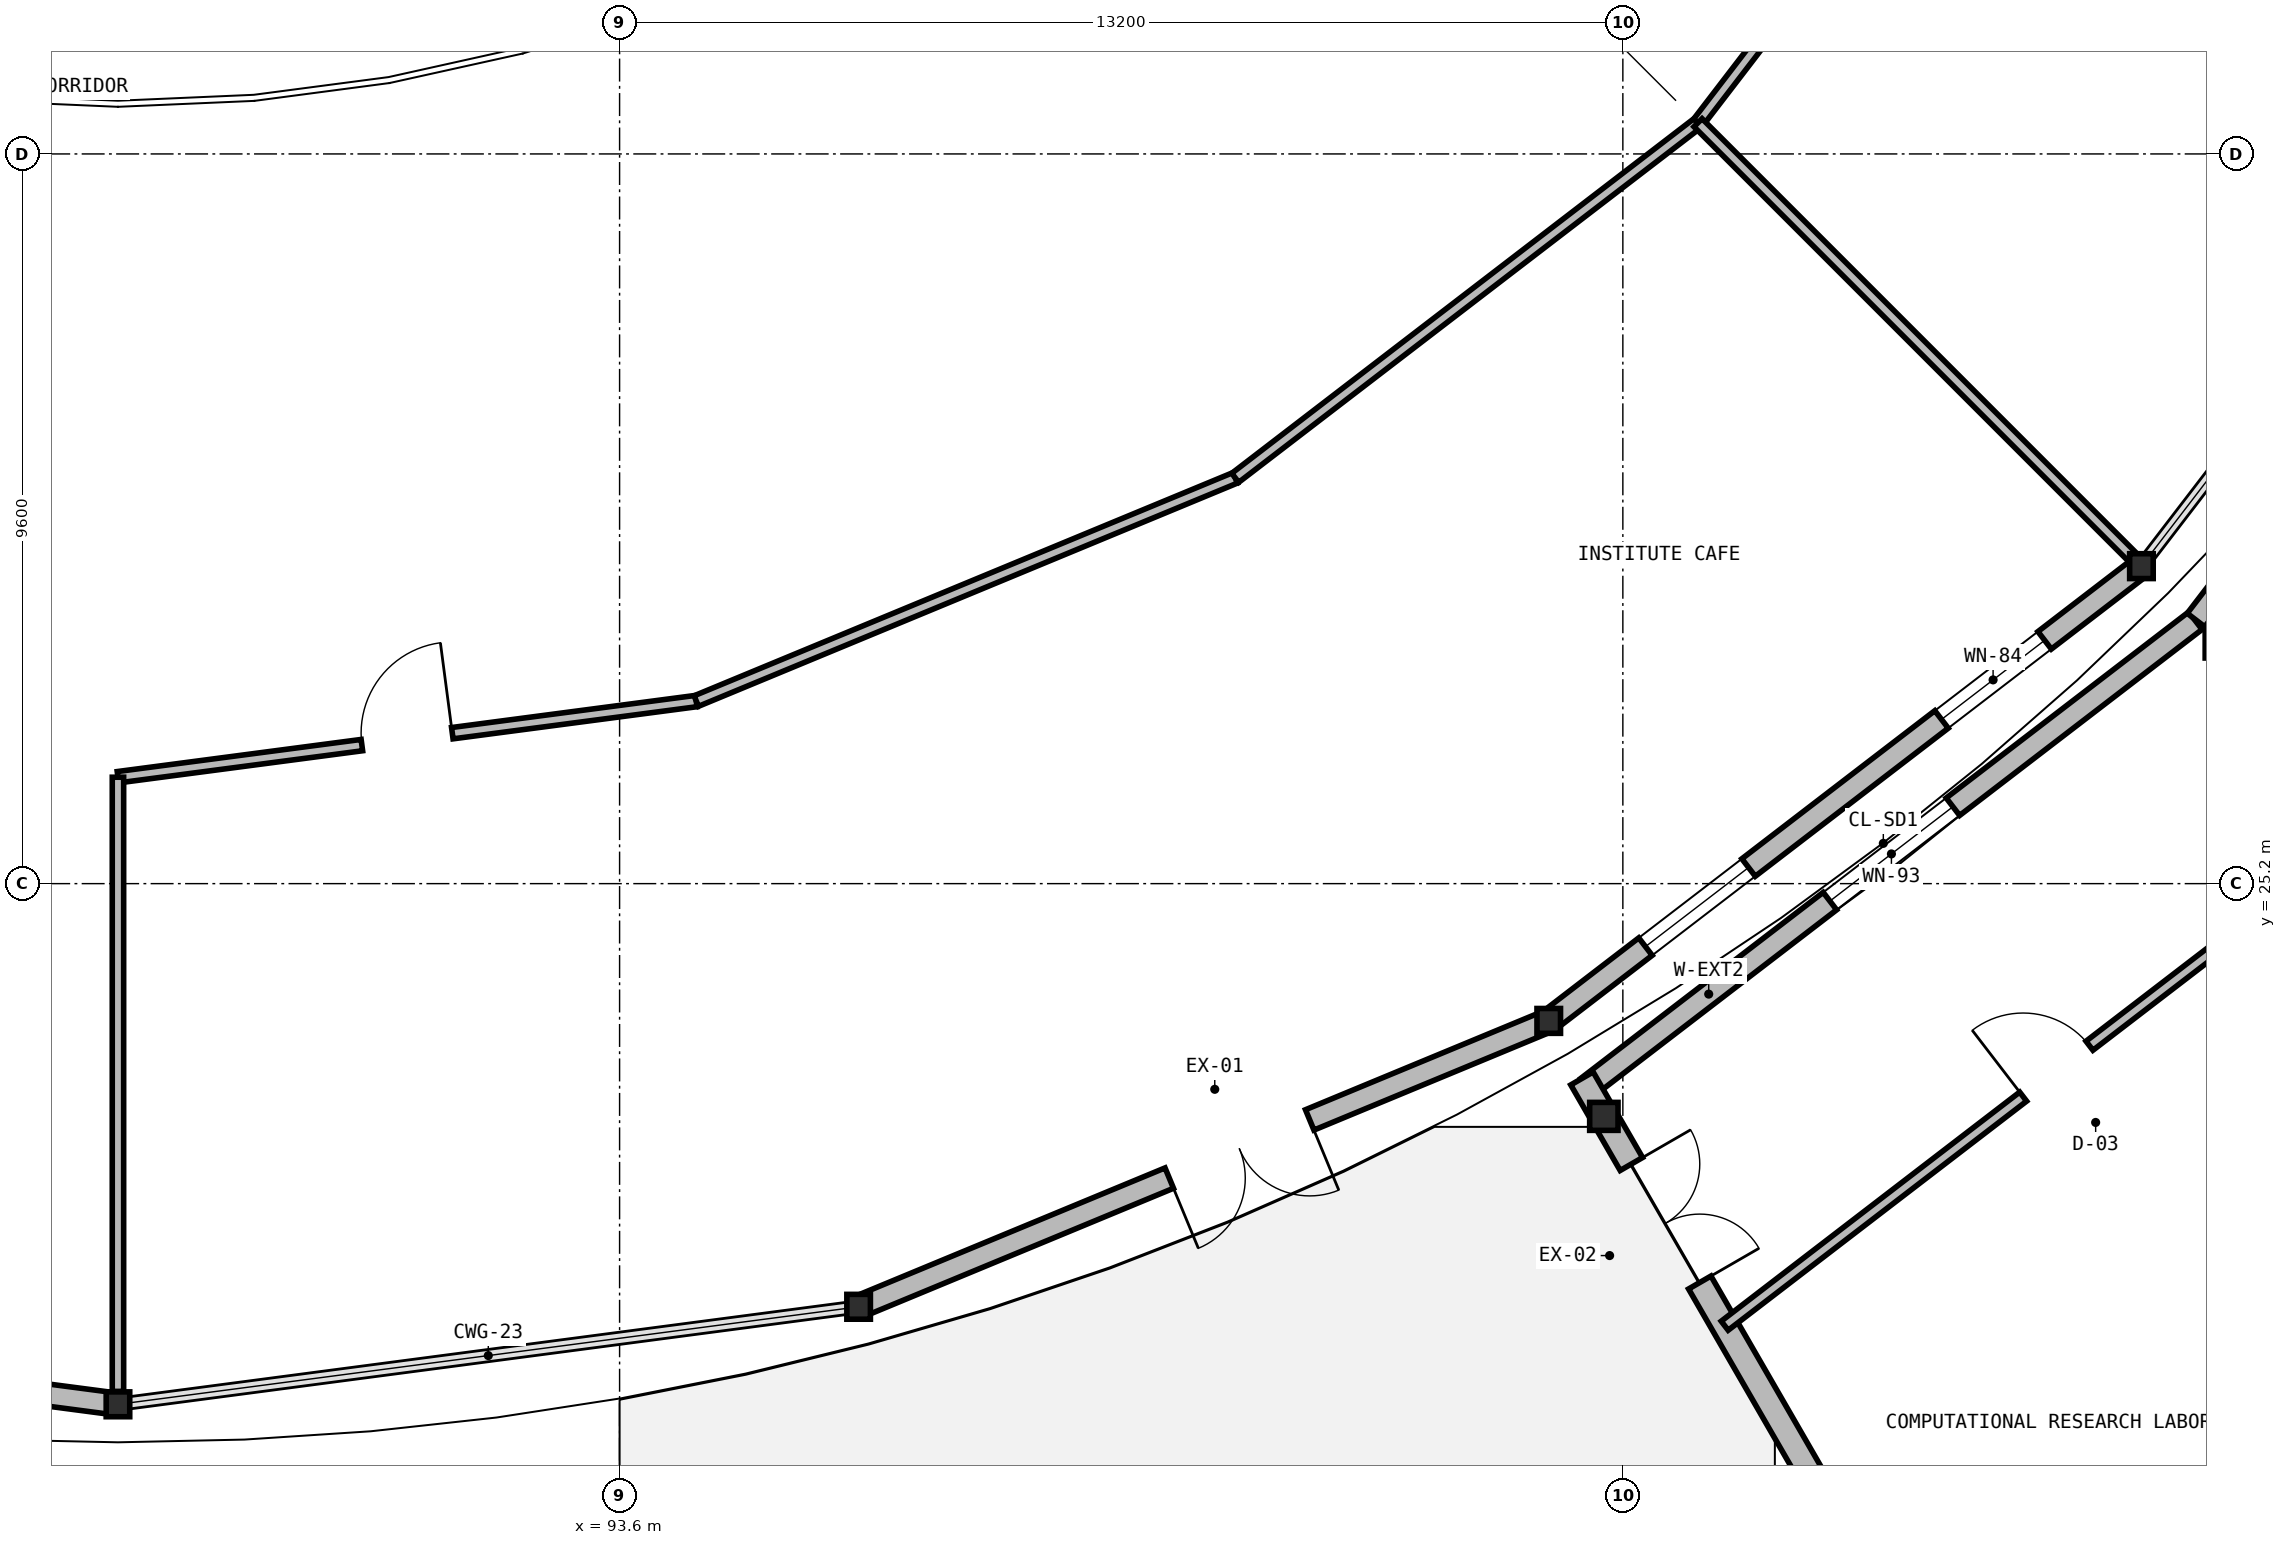
"""IFC4 building model, lengths in metres.
Left out: names, types, materials, properties, quantities, classifications, styles, units other than length and angle.
Written with IfcOpenShell. Run it as: python <this file> out.ifc"""

import sys

from ifc_helpers import new_model, si_unit, direction, frame, frame_2d, origin, origin_2d, place, context, subcontext, project, spatial, rectangle, i_section, extrude, element, fill, save


model = new_model("IFC4")
c1 = context("Model", 3, precision=1e-05, world=origin(), true_north=direction((0.0, 1.0)))
c2 = subcontext(c1, "Body", "Model", "MODEL_VIEW")
j1 = project(units=[si_unit("LENGTHUNIT", "METRE"), si_unit("PLANEANGLEUNIT", "RADIAN")], contexts=[c1])
p1 = place(None, origin())
s1 = spatial("IfcSite", under=j1, at=p1, CompositionType="ELEMENT")
p2 = place(p1, origin())
s2 = spatial("IfcBuilding", under=s1, at=p2, CompositionType="ELEMENT")
p3 = place(p2, origin())
s3 = spatial("IfcBuildingStorey", under=s2, at=p3, CompositionType="ELEMENT", Elevation=0.0)
for number, where, z_axis, x_axis in (
    (1, (106.55, 22.138, 0.0), (0.0, 0.0, 1.0), (1.0, 0.0, 0.0)),
    (2, (114.648, 28.352, 0.0), (0.0, 0.0, 1.0), (1.0, 0.0, 0.0)),
):
    element("IfcColumn", number, at=place(p3, frame(where, z_axis=z_axis, x_axis=x_axis)), inside=s3, PredefinedType="COLUMN", context=c2, shape_type="SweptSolid", body=[
        extrude(i_section(OverallWidth=0.373, OverallDepth=0.368, WebThickness=0.017, FlangeThickness=0.027, at=origin_2d()), origin(), (0.0, 0.0, 1.0), 5.25),
    ])
for number, where, z_axis, x_axis in (
    (3, (87.0, 18.35, 0.0), (0.0, 0.0, 1.0), (1.0, 0.0, 0.0)),
    (4, (96.745, 19.633, 0.0), (0.0, 0.0, 1.0), (1.0, 0.0, 0.0)),
    (5, (105.825, 23.394, 0.0), (0.0, 0.0, 1.0), (1.0, 0.0, 0.0)),
    (6, (113.623, 29.377, 0.0), (0.0, 0.0, 1.0), (1.0, 0.0, 0.0)),
):
    element("IfcColumn", number, at=place(p3, frame(where, z_axis=z_axis, x_axis=x_axis)), inside=s3, PredefinedType="COLUMN", context=c2, shape_type="SweptSolid", body=[
        extrude(i_section(OverallWidth=0.31, OverallDepth=0.327, WebThickness=0.016, FlangeThickness=0.025, at=origin_2d()), origin(), (0.0, 0.0, 1.0), 5.25),
    ])
p4 = place(p3, frame((106.335, 22.523, 0.0), z_axis=(0.0, 0.0, 1.0), x_axis=(0.793371621275, 0.608737604027, 0.0)))
e7 = element("IfcWall", 7, at=p4, inside=s3, PredefinedType="SOLIDWALL", context=c2, shape_type="SweptSolid", body=[
    extrude(rectangle(XDim=10.08, YDim=0.29, at=frame_2d((5.04, 0.0))), origin(), (0.0, 0.0, 1.0), 4.469),
])
p5 = place(p4, frame((4.02, 0.0, 0.95)))
e8 = element("IfcOpeningElement", 8, at=p5, cuts=e7, PredefinedType="OPENING", context=c2, shape_type="SweptSolid", body=[
    extrude(rectangle(XDim=2.04, YDim=1.67, at=frame_2d((1.02, 0.835))), frame((0.0, 0.155, 0.0), z_axis=(0.0, -1.0, 0.0), x_axis=(1.0, 0.0, 0.0)), (0.0, 0.0, 1.0), 0.31),
])
p6 = place(p3, frame((114.341, 28.668, 0.0), z_axis=(0.0, 0.0, 1.0), x_axis=(0.608737604027, 0.793371621275, 0.0)))
e9 = element("IfcWall", 9, at=p6, inside=s3, PredefinedType="SOLIDWALL", context=c2, shape_type="SweptSolid", body=[
    extrude(rectangle(XDim=10.08, YDim=0.29, at=frame_2d((5.04, 0.0))), origin(), (0.0, 0.0, 1.0), 4.516),
])
p7 = place(p6, frame((3.855, 0.0, 0.95)))
e10 = element("IfcOpeningElement", 10, at=p7, cuts=e9, PredefinedType="OPENING", context=c2, shape_type="SweptSolid", body=[
    extrude(rectangle(XDim=2.37, YDim=1.59, at=frame_2d((1.185, 0.795))), frame((0.0, 0.155, 0.0), z_axis=(0.0, -1.0, 0.0), x_axis=(1.0, 0.0, 0.0)), (0.0, 0.0, 1.0), 0.31),
])
p8 = place(p3, frame((106.262, 22.637, 0.0), z_axis=(0.0, 0.0, 1.0), x_axis=(0.500037643518, -0.866003669198, 0.0)))
e11 = element("IfcWall", 11, at=p8, inside=s3, PredefinedType="SOLIDWALL", context=c2, shape_type="SweptSolid", body=[
    extrude(rectangle(XDim=10.951, YDim=0.34, at=frame_2d((5.476, 0.0))), origin(), (0.0, 0.0, 1.0), 4.386),
])
p9 = place(p8, frame((1.3, 0.0, 0.0)))
e12 = element("IfcOpeningElement", 12, at=p9, cuts=e11, PredefinedType="OPENING", context=c2, shape_type="SweptSolid", body=[
    extrude(rectangle(XDim=1.8, YDim=2.25, at=frame_2d((0.9, 1.125))), frame((0.0, 0.18, 0.0), z_axis=(0.0, -1.0, 0.0), x_axis=(1.0, 0.0, 0.0)), (0.0, 0.0, 1.0), 0.36),
])
p10 = place(p3, frame((86.996, 18.351, 0.0), z_axis=(0.0, 0.0, 1.0), x_axis=(-0.991456749128, 0.130435863969, 0.0)))
e13 = element("IfcWall", 13, at=p10, inside=s3, PredefinedType="SOLIDWALL", context=c2, shape_type="SweptSolid", body=[
    extrude(rectangle(XDim=9.821, YDim=0.29, at=frame_2d((4.911, 0.0))), origin(), (0.0, 0.0, 1.0), 4.593),
])
p11 = place(p10, frame((3.4, 0.0, 0.0)))
e14 = element("IfcOpeningElement", 14, at=p11, cuts=e13, PredefinedType="OPENING", context=c2, shape_type="SweptSolid", body=[
    extrude(rectangle(XDim=2.0, YDim=2.3, at=frame_2d((1.0, 1.15))), frame((0.0, 0.155, 0.0), z_axis=(0.0, -1.0, 0.0), x_axis=(1.0, 0.0, 0.0)), (0.0, 0.0, 1.0), 0.31),
])
p12 = place(p3, frame((105.821, 23.393, 0.0), z_axis=(0.0, 0.0, 1.0), x_axis=(-0.923848052238, -0.382759423628, 0.0)))
e15 = element("IfcWall", 15, at=p12, inside=s3, PredefinedType="SOLIDWALL", context=c2, shape_type="SweptSolid", body=[
    extrude(rectangle(XDim=9.821, YDim=0.29, at=frame_2d((4.91, 0.0))), origin(), (0.0, 0.0, 1.0), 4.593),
])
p13 = place(p12, frame((3.4, 0.0, 0.0)))
e16 = element("IfcOpeningElement", 16, at=p13, cuts=e15, PredefinedType="OPENING", context=c2, shape_type="SweptSolid", body=[
    extrude(rectangle(XDim=2.0, YDim=2.3, at=frame_2d((1.0, 1.15))), frame((0.0, 0.155, 0.0), z_axis=(0.0, -1.0, 0.0), x_axis=(1.0, 0.0, 0.0)), (0.0, 0.0, 1.0), 0.31),
])
p14 = place(p3, frame((113.619, 29.375, 0.0), z_axis=(0.0, 0.0, 1.0), x_axis=(-0.793364612762, -0.608746738158, 0.0)))
e17 = element("IfcWall", 17, at=p14, inside=s3, PredefinedType="SOLIDWALL", context=c2, shape_type="SweptSolid", body=[
    extrude(rectangle(XDim=9.82, YDim=0.29, at=frame_2d((4.91, 0.0))), origin(), (0.0, 0.0, 1.0), 4.469),
])
p15 = place(p14, frame((1.6, 0.0, 0.95)))
e18 = element("IfcOpeningElement", 18, at=p15, cuts=e17, PredefinedType="OPENING", context=c2, shape_type="SweptSolid", body=[
    extrude(rectangle(XDim=1.71, YDim=1.64, at=frame_2d((0.855, 0.82))), frame((0.0, 0.155, 0.0), z_axis=(0.0, -1.0, 0.0), x_axis=(1.0, 0.0, 0.0)), (0.0, 0.0, 1.0), 0.31),
])
p16 = place(p14, frame((6.51, 0.0, 0.95)))
e19 = element("IfcOpeningElement", 19, at=p16, cuts=e17, PredefinedType="OPENING", context=c2, shape_type="SweptSolid", body=[
    extrude(rectangle(XDim=1.71, YDim=1.64, at=frame_2d((0.855, 0.82))), frame((0.0, 0.155, 0.0), z_axis=(0.0, -1.0, 0.0), x_axis=(1.0, 0.0, 0.0)), (0.0, 0.0, 1.0), 0.31),
])
p17 = place(p3, frame((108.14, 19.384, 0.0), z_axis=(0.0, 0.0, 1.0), x_axis=(0.793301872689, 0.608828497024, 0.0)))
e20 = element("IfcWall", 20, at=p17, inside=s3, PredefinedType="PARTITIONING", context=c2, shape_type="SweptSolid", body=[
    extrude(rectangle(XDim=11.038, YDim=0.15, at=frame_2d((5.519, 0.0))), origin(), (0.0, 0.0, 1.0), 4.391),
])
p18 = place(p17, frame((4.95, 0.0, 0.0)))
e21 = element("IfcOpeningElement", 21, at=p18, cuts=e20, PredefinedType="OPENING", context=c2, shape_type="SweptSolid", body=[
    extrude(rectangle(XDim=1.1, YDim=2.2, at=frame_2d((0.55, 1.1))), frame((0.0, 0.085, 0.0), z_axis=(0.0, -1.0, 0.0), x_axis=(1.0, 0.0, 0.0)), (0.0, 0.0, 1.0), 0.17),
])
p19 = place(p3, frame((87.0, 26.6, 0.0), z_axis=(0.0, 0.0, 1.0), x_axis=(0.991441080731, 0.130554905837, 0.0)))
e22 = element("IfcWall", 22, at=p19, inside=s3, PredefinedType="PARTITIONING", context=c2, shape_type="SweptSolid", body=[
    extrude(rectangle(XDim=7.675, YDim=0.15, at=frame_2d((3.837, 0.0))), origin(), (0.0, 0.0, 1.0), 4.93),
])
p20 = place(p19, frame((3.237, 0.0, 0.0)))
e23 = element("IfcOpeningElement", 23, at=p20, cuts=e22, PredefinedType="OPENING", context=c2, shape_type="SweptSolid", body=[
    extrude(rectangle(XDim=1.2, YDim=2.2, at=frame_2d((0.6, 1.1))), frame((0.0, 0.085, 0.0), z_axis=(0.0, -1.0, 0.0), x_axis=(1.0, 0.0, 0.0)), (0.0, 0.0, 1.0), 0.17),
])
p21 = place(p3, frame((94.609, 27.602, 0.0), z_axis=(0.0, 0.0, 1.0), x_axis=(0.923888899357, 0.382660818016, 0.0)))
e24 = element("IfcWall", 24, at=p21, inside=s3, PredefinedType="PARTITIONING", context=c2, shape_type="SweptSolid", body=[
    extrude(rectangle(XDim=7.675, YDim=0.15, at=frame_2d((3.838, 0.0))), origin(), (0.0, 0.0, 1.0), 4.93),
])
p22 = place(p3, frame((101.7, 30.539, 0.0), z_axis=(0.0, 0.0, 1.0), x_axis=(0.793382566499, 0.60872333878, 0.0)))
e25 = element("IfcWall", 25, at=p22, inside=s3, PredefinedType="PARTITIONING", context=c2, shape_type="SweptSolid", body=[
    extrude(rectangle(XDim=7.675, YDim=0.15, at=frame_2d((3.837, 0.0))), origin(), (0.0, 0.0, 1.0), 4.93),
])
p23 = place(p3, frame((107.789, 35.211, 0.0), z_axis=(0.0, 0.0, 1.0), x_axis=(0.60872333878, 0.793382566499, 0.0)))
e26 = element("IfcWall", 26, at=p23, inside=s3, PredefinedType="PARTITIONING", context=c2, shape_type="SweptSolid", body=[
    extrude(rectangle(XDim=7.675, YDim=0.15, at=frame_2d((3.837, 0.0))), origin(), (0.0, 0.0, 1.0), 4.517),
])
p24 = place(p23, frame((3.237, 0.0, 0.0)))
e27 = element("IfcOpeningElement", 27, at=p24, cuts=e26, PredefinedType="OPENING", context=c2, shape_type="SweptSolid", body=[
    extrude(rectangle(XDim=1.2, YDim=2.2, at=frame_2d((0.6, 1.1))), frame((0.0, 0.085, 0.0), z_axis=(0.0, -1.0, 0.0), x_axis=(1.0, 0.0, 0.0)), (0.0, 0.0, 1.0), 0.17),
])
p25 = place(p3, frame((87.0, 26.6, 0.0), z_axis=(0.0, 0.0, 1.0), x_axis=(0.0, -1.0, 0.0)))
e28 = element("IfcWall", 28, at=p25, inside=s3, PredefinedType="PARTITIONING", context=c2, shape_type="SweptSolid", body=[
    extrude(rectangle(XDim=8.08, YDim=0.15, at=frame_2d((4.04, 0.0))), origin(), (0.0, 0.0, 1.0), 4.598),
])
p26 = place(p3, frame((107.789, 35.211, 0.0), z_axis=(0.0, 0.0, 1.0), x_axis=(0.707106781187, -0.707106781187, 0.0)))
e29 = element("IfcWall", 29, at=p26, inside=s3, PredefinedType="PARTITIONING", context=c2, shape_type="SweptSolid", body=[
    extrude(rectangle(XDim=8.079, YDim=0.15, at=frame_2d((4.04, 0.0))), origin(), (0.0, 0.0, 1.0), 4.598),
])
p27 = place(p5, origin())
e30 = element("IfcWindow", 30, at=p27, inside=s3, PartitioningType="SINGLE_PANEL", PredefinedType="WINDOW", context=c2, shape_type="SweptSolid", body=[
    extrude(rectangle(XDim=2.04, YDim=1.67, at=frame_2d((1.02, 0.835))), frame((0.0, 0.03, 0.0), z_axis=(0.0, -1.0, 0.0), x_axis=(1.0, 0.0, 0.0)), (0.0, 0.0, 1.0), 0.06),
])
fill(e8, e30)
p28 = place(p9, origin())
e31 = element("IfcDoor", 31, at=p28, inside=s3, OperationType="DOUBLE_DOOR_SINGLE_SWING", PredefinedType="DOOR", context=c2, shape_type="SweptSolid", body=[
    extrude(rectangle(XDim=1.8, YDim=2.25, at=frame_2d((0.9, 1.125))), frame((0.0, 0.025, 0.0), z_axis=(0.0, -1.0, 0.0), x_axis=(1.0, 0.0, 0.0)), (0.0, 0.0, 1.0), 0.05),
])
fill(e12, e31)
p29 = place(p13, origin())
e32 = element("IfcDoor", 32, at=p29, inside=s3, OperationType="DOUBLE_DOOR_SINGLE_SWING", PredefinedType="DOOR", context=c2, shape_type="SweptSolid", body=[
    extrude(rectangle(XDim=2.0, YDim=2.3, at=frame_2d((1.0, 1.15))), frame((0.0, 0.025, 0.0), z_axis=(0.0, -1.0, 0.0), x_axis=(1.0, 0.0, 0.0)), (0.0, 0.0, 1.0), 0.05),
])
fill(e16, e32)
p30 = place(p15, origin())
e33 = element("IfcWindow", 33, at=p30, inside=s3, PartitioningType="SINGLE_PANEL", PredefinedType="WINDOW", context=c2, shape_type="SweptSolid", body=[
    extrude(rectangle(XDim=1.71, YDim=1.64, at=frame_2d((0.855, 0.82))), frame((0.0, 0.03, 0.0), z_axis=(0.0, -1.0, 0.0), x_axis=(1.0, 0.0, 0.0)), (0.0, 0.0, 1.0), 0.06),
])
fill(e18, e33)
p31 = place(p16, origin())
e34 = element("IfcWindow", 34, at=p31, inside=s3, PartitioningType="SINGLE_PANEL", PredefinedType="WINDOW", context=c2, shape_type="SweptSolid", body=[
    extrude(rectangle(XDim=1.71, YDim=1.64, at=frame_2d((0.855, 0.82))), frame((0.0, 0.03, 0.0), z_axis=(0.0, -1.0, 0.0), x_axis=(1.0, 0.0, 0.0)), (0.0, 0.0, 1.0), 0.06),
])
fill(e19, e34)
p32 = place(p18, origin())
e35 = element("IfcDoor", 35, at=p32, inside=s3, OperationType="SINGLE_SWING_LEFT", PredefinedType="DOOR", context=c2, shape_type="SweptSolid", body=[
    extrude(rectangle(XDim=1.1, YDim=2.2, at=frame_2d((0.55, 1.1))), frame((0.0, 0.025, 0.0), z_axis=(0.0, -1.0, 0.0), x_axis=(1.0, 0.0, 0.0)), (0.0, 0.0, 1.0), 0.05),
])
fill(e21, e35)
p33 = place(p20, origin())
e36 = element("IfcDoor", 36, at=p33, inside=s3, OperationType="SINGLE_SWING_RIGHT", PredefinedType="DOOR", context=c2, shape_type="SweptSolid", body=[
    extrude(rectangle(XDim=1.2, YDim=2.2, at=frame_2d((0.6, 1.1))), frame((0.0, 0.025, 0.0), z_axis=(0.0, -1.0, 0.0), x_axis=(1.0, 0.0, 0.0)), (0.0, 0.0, 1.0), 0.05),
])
fill(e23, e36)
save(model, sys.argv[1])
